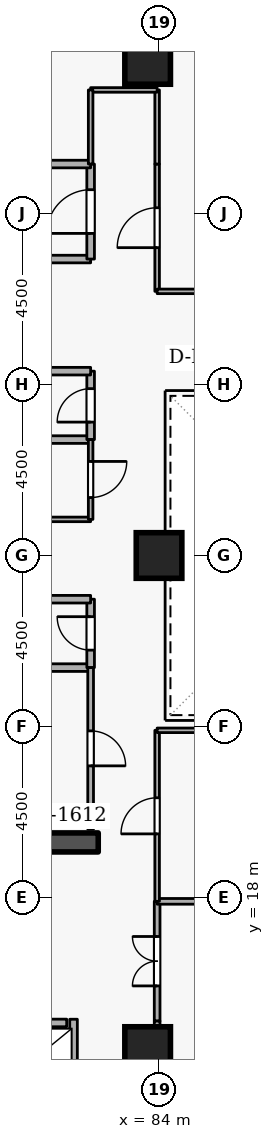
"""IFC4 building model, lengths in metres.
Left out: names, types, materials, properties, quantities, classifications, styles, units other than length and angle.
Written with IfcOpenShell. Run it as: python <this file> out.ifc"""

import sys

from ifc_helpers import new_model, si_unit, direction, frame, frame_2d, origin, origin_2d, place, context, subcontext, project, spatial, rectangle, extrude, element, fill, save


model = new_model("IFC4")
c1 = context("Model", 3, precision=1e-05, world=origin(), true_north=direction((0.0, 1.0)))
c2 = subcontext(c1, "Body", "Model", "MODEL_VIEW")
j1 = project(units=[si_unit("LENGTHUNIT", "METRE"), si_unit("PLANEANGLEUNIT", "RADIAN")], contexts=[c1])
p1 = place(None, origin())
s1 = spatial("IfcSite", under=j1, at=p1, CompositionType="ELEMENT")
p2 = place(p1, origin())
s2 = spatial("IfcBuilding", under=s1, at=p2, CompositionType="ELEMENT")
p3 = place(p2, frame((0.0, 0.0, 134.1)))
s3 = spatial("IfcBuildingStorey", under=s2, at=p3, CompositionType="ELEMENT", Elevation=134.1)
p4 = place(p3, frame((76.6, 19.45, 0.0), z_axis=(0.0, 0.0, 1.0), x_axis=(1.0, 0.0, 0.0)))
e1 = element("IfcWall", 1, at=p4, inside=s3, PredefinedType="SHEAR", context=c2, shape_type="SweptSolid", body=[
    extrude(rectangle(XDim=5.8, YDim=0.5, at=frame_2d((2.9, 0.0))), origin(), (0.0, 0.0, 1.0), 3.6),
])
for number, where, z_axis, x_axis in (
    (2, (83.7, 14.0, 0.0), (0.0, 0.0, 1.0), (1.0, 0.0, 0.0)),
    (3, (83.7, 40.0, 0.0), (0.0, 0.0, 1.0), (1.0, 0.0, 0.0)),
    (4, (84.0, 27.0, 0.0), (0.0, 0.0, 1.0), (1.0, 0.0, 0.0)),
):
    element("IfcColumn", number, at=place(p3, frame(where, z_axis=z_axis, x_axis=x_axis)), inside=s3, PredefinedType="COLUMN", context=c2, shape_type="SweptSolid", body=[
        extrude(rectangle(XDim=1.2, YDim=1.2, at=origin_2d()), origin(), (0.0, 0.0, 1.0), 3.6),
    ])
p5 = place(p3, frame((79.63, 14.7, 0.0), z_axis=(0.0, 0.0, 1.0), x_axis=(1.0, 0.0, 0.0)))
e5 = element("IfcWall", 5, at=p5, inside=s3, PredefinedType="STANDARD", context=c2, shape_type="SweptSolid", body=[
    extrude(rectangle(XDim=1.94, YDim=0.2, at=frame_2d((0.97, 0.0))), origin(), (0.0, 0.0, 1.0), 3.34),
])
p6 = place(p5, frame((0.46, 0.0, 0.0)))
e6 = element("IfcOpeningElement", 6, at=p6, cuts=e5, PredefinedType="OPENING", context=c2, shape_type="SweptSolid", body=[
    extrude(rectangle(XDim=1.02, YDim=2.06, at=frame_2d((0.51, 1.03))), frame((0.0, 0.11, 0.0), z_axis=(0.0, -1.0, 0.0), x_axis=(1.0, 0.0, 0.0)), (0.0, 0.0, 1.0), 0.22),
])
p7 = place(p3, frame((81.75, 12.612, 0.0), z_axis=(0.0, 0.0, 1.0), x_axis=(0.0, 1.0, 0.0)))
e7 = element("IfcWall", 7, at=p7, inside=s3, PredefinedType="STANDARD", context=c2, shape_type="SweptSolid", body=[
    extrude(rectangle(XDim=2.186, YDim=0.2, at=frame_2d((1.093, 0.0))), origin(), (0.0, 0.0, 1.0), 3.34),
])
p8 = place(p3, frame((79.9, 34.8, 0.0), z_axis=(0.0, 0.0, 1.0), x_axis=(1.0, 0.0, 0.0)))
e8 = element("IfcWall", 8, at=p8, inside=s3, PredefinedType="STANDARD", context=c2, shape_type="SweptSolid", body=[
    extrude(rectangle(XDim=2.3, YDim=0.2, at=frame_2d((1.15, 0.0))), origin(), (0.0, 0.0, 1.0), 2.545),
])
p9 = place(p3, frame((82.2, 34.8, 0.0), z_axis=(0.0, 0.0, 1.0), x_axis=(0.0, 1.0, 0.0)))
e9 = element("IfcWall", 9, at=p9, inside=s3, PredefinedType="STANDARD", context=c2, shape_type="SweptSolid", body=[
    extrude(rectangle(XDim=2.5, YDim=0.2, at=frame_2d((1.25, 0.0))), origin(), (0.0, 0.0, 1.0), 3.34),
])
p10 = place(p9, frame((0.675, 0.0, 0.0)))
e10 = element("IfcOpeningElement", 10, at=p10, cuts=e9, PredefinedType="OPENING", context=c2, shape_type="SweptSolid", body=[
    extrude(rectangle(XDim=1.15, YDim=2.1, at=frame_2d((0.575, 1.05))), frame((0.0, 0.11, 0.0), z_axis=(0.0, -1.0, 0.0), x_axis=(1.0, 0.0, 0.0)), (0.0, 0.0, 1.0), 0.22),
])
p11 = place(p3, frame((82.2, 37.3, 0.0), z_axis=(0.0, 0.0, 1.0), x_axis=(-1.0, 0.0, 0.0)))
e11 = element("IfcWall", 11, at=p11, inside=s3, PredefinedType="STANDARD", context=c2, shape_type="SweptSolid", body=[
    extrude(rectangle(XDim=5.7, YDim=0.2, at=frame_2d((2.85, 0.0))), origin(), (0.0, 0.0, 1.0), 3.34),
])
p12 = place(p3, frame((80.15, 24.05, 0.0), z_axis=(0.0, 0.0, 1.0), x_axis=(1.0, 0.0, 0.0)))
e12 = element("IfcWall", 12, at=p12, inside=s3, PredefinedType="STANDARD", context=c2, shape_type="SweptSolid", body=[
    extrude(rectangle(XDim=2.05, YDim=0.2, at=frame_2d((1.025, 0.0))), origin(), (0.0, 0.0, 1.0), 3.34),
])
p13 = place(p3, frame((82.2, 24.05, 0.0), z_axis=(0.0, 0.0, 1.0), x_axis=(0.0, 1.0, 0.0)))
e13 = element("IfcWall", 13, at=p13, inside=s3, PredefinedType="STANDARD", context=c2, shape_type="SweptSolid", body=[
    extrude(rectangle(XDim=1.8, YDim=0.2, at=frame_2d((0.9, 0.0))), origin(), (0.0, 0.0, 1.0), 3.34),
])
p14 = place(p13, frame((0.46, 0.0, 0.0)))
e14 = element("IfcOpeningElement", 14, at=p14, cuts=e13, PredefinedType="OPENING", context=c2, shape_type="SweptSolid", body=[
    extrude(rectangle(XDim=0.88, YDim=2.04, at=frame_2d((0.44, 1.02))), frame((0.0, 0.11, 0.0), z_axis=(0.0, -1.0, 0.0), x_axis=(1.0, 0.0, 0.0)), (0.0, 0.0, 1.0), 0.22),
])
for number, where, z_axis, x_axis in (
    (15, (82.2, 25.85, 0.0), (0.0, 0.0, 1.0), (-1.0, 0.0, 0.0)),
    (16, (80.15, 30.05, 0.0), (0.0, 0.0, 1.0), (1.0, 0.0, 0.0)),
):
    element("IfcWall", number, at=place(p3, frame(where, z_axis=z_axis, x_axis=x_axis)), inside=s3, PredefinedType="STANDARD", context=c2, shape_type="SweptSolid", body=[
        extrude(rectangle(XDim=2.05, YDim=0.2, at=frame_2d((1.025, 0.0))), origin(), (0.0, 0.0, 1.0), 3.34),
    ])
p15 = place(p3, frame((82.2, 30.05, 0.0), z_axis=(0.0, 0.0, 1.0), x_axis=(0.0, 1.0, 0.0)))
e17 = element("IfcWall", 17, at=p15, inside=s3, PredefinedType="STANDARD", context=c2, shape_type="SweptSolid", body=[
    extrude(rectangle(XDim=1.8, YDim=0.2, at=frame_2d((0.9, 0.0))), origin(), (0.0, 0.0, 1.0), 3.34),
])
p16 = place(p15, frame((0.46, 0.0, 0.0)))
e18 = element("IfcOpeningElement", 18, at=p16, cuts=e17, PredefinedType="OPENING", context=c2, shape_type="SweptSolid", body=[
    extrude(rectangle(XDim=0.88, YDim=2.04, at=frame_2d((0.44, 1.02))), frame((0.0, 0.11, 0.0), z_axis=(0.0, -1.0, 0.0), x_axis=(1.0, 0.0, 0.0)), (0.0, 0.0, 1.0), 0.22),
])
p17 = place(p3, frame((82.2, 31.85, 0.0), z_axis=(0.0, 0.0, 1.0), x_axis=(-1.0, 0.0, 0.0)))
e19 = element("IfcWall", 19, at=p17, inside=s3, PredefinedType="STANDARD", context=c2, shape_type="SweptSolid", body=[
    extrude(rectangle(XDim=2.05, YDim=0.2, at=frame_2d((1.025, 0.0))), origin(), (0.0, 0.0, 1.0), 3.34),
])
p18 = place(p3, frame((82.2, 24.05, 0.0), z_axis=(0.0, 0.0, 1.0), x_axis=(0.0, -1.0, 0.0)))
e20 = element("IfcWall", 20, at=p18, inside=s3, PredefinedType="PARTITIONING", context=c2, shape_type="SweptSolid", body=[
    extrude(rectangle(XDim=4.25, YDim=0.15, at=frame_2d((2.125, 0.0))), origin(), (0.0, 0.0, 1.0), 3.34),
])
p19 = place(p18, frame((1.665, 0.0, 0.0)))
e21 = element("IfcOpeningElement", 21, at=p19, cuts=e20, PredefinedType="OPENING", context=c2, shape_type="SweptSolid", body=[
    extrude(rectangle(XDim=0.92, YDim=2.08, at=frame_2d((0.46, 1.04))), frame((0.0, 0.085, 0.0), z_axis=(0.0, -1.0, 0.0), x_axis=(1.0, 0.0, 0.0)), (0.0, 0.0, 1.0), 0.17),
])
p20 = place(p3, frame((82.2, 27.95, 0.0), z_axis=(0.0, 0.0, 1.0), x_axis=(-1.0, 0.0, 0.0)))
e22 = element("IfcWall", 22, at=p20, inside=s3, PredefinedType="PARTITIONING", context=c2, shape_type="SweptSolid", body=[
    extrude(rectangle(XDim=2.05, YDim=0.12, at=frame_2d((1.025, 0.0))), origin(), (0.0, 0.0, 1.0), 3.34),
])
p21 = place(p3, frame((82.2, 30.05, 0.0), z_axis=(0.0, 0.0, 1.0), x_axis=(0.0, -1.0, 0.0)))
e23 = element("IfcWall", 23, at=p21, inside=s3, PredefinedType="PARTITIONING", context=c2, shape_type="SweptSolid", body=[
    extrude(rectangle(XDim=2.1, YDim=0.12, at=frame_2d((1.05, 0.0))), origin(), (0.0, 0.0, 1.0), 3.34),
])
p22 = place(p21, frame((0.575, 0.0, 0.0)))
e24 = element("IfcOpeningElement", 24, at=p22, cuts=e23, PredefinedType="OPENING", context=c2, shape_type="SweptSolid", body=[
    extrude(rectangle(XDim=0.95, YDim=2.1, at=frame_2d((0.475, 1.05))), frame((0.0, 0.07, 0.0), z_axis=(0.0, -1.0, 0.0), x_axis=(1.0, 0.0, 0.0)), (0.0, 0.0, 1.0), 0.14),
])
p23 = place(p3, frame((83.95, 14.75, 0.0), z_axis=(0.0, 0.0, 1.0), x_axis=(0.0, 1.0, 0.0)))
e25 = element("IfcWall", 25, at=p23, inside=s3, PredefinedType="PARTITIONING", context=c2, shape_type="SweptSolid", body=[
    extrude(rectangle(XDim=3.15, YDim=0.15, at=frame_2d((1.575, 0.0))), origin(), (0.0, 0.0, 1.0), 3.34),
])
p24 = place(p23, frame((0.925, 0.0, 0.0)))
e26 = element("IfcOpeningElement", 26, at=p24, cuts=e25, PredefinedType="OPENING", context=c2, shape_type="SweptSolid", body=[
    extrude(rectangle(XDim=1.3, YDim=2.12, at=frame_2d((0.65, 1.06))), frame((0.0, 0.085, 0.0), z_axis=(0.0, -1.0, 0.0), x_axis=(1.0, 0.0, 0.0)), (0.0, 0.0, 1.0), 0.17),
])
p25 = place(p3, frame((83.95, 17.9, 0.0), z_axis=(0.0, 0.0, 1.0), x_axis=(1.0, 0.0, 0.0)))
e27 = element("IfcWall", 27, at=p25, inside=s3, PredefinedType="PARTITIONING", context=c2, shape_type="SweptSolid", body=[
    extrude(rectangle(XDim=4.55, YDim=0.15, at=frame_2d((2.275, 0.0))), origin(), (0.0, 0.0, 1.0), 3.34),
])
p26 = place(p3, frame((83.95, 12.4, 0.0), z_axis=(0.0, 0.0, 1.0), x_axis=(0.0, 1.0, 0.0)))
e28 = element("IfcWall", 28, at=p26, inside=s3, PredefinedType="PARTITIONING", context=c2, shape_type="SweptSolid", body=[
    extrude(rectangle(XDim=2.35, YDim=0.15, at=frame_2d((1.175, 0.0))), origin(), (0.0, 0.0, 1.0), 3.34),
])
p27 = place(p3, frame((83.95, 17.9, 0.0), z_axis=(0.0, 0.0, 1.0), x_axis=(0.0, 1.0, 0.0)))
e29 = element("IfcWall", 29, at=p27, inside=s3, PredefinedType="PARTITIONING", context=c2, shape_type="SweptSolid", body=[
    extrude(rectangle(XDim=4.5, YDim=0.12, at=frame_2d((2.25, 0.0))), origin(), (0.0, 0.0, 1.0), 3.34),
])
p28 = place(p27, frame((1.775, 0.0, 0.0)))
e30 = element("IfcOpeningElement", 30, at=p28, cuts=e29, PredefinedType="OPENING", context=c2, shape_type="SweptSolid", body=[
    extrude(rectangle(XDim=0.95, YDim=2.1, at=frame_2d((0.475, 1.05))), frame((0.0, 0.07, 0.0), z_axis=(0.0, -1.0, 0.0), x_axis=(1.0, 0.0, 0.0)), (0.0, 0.0, 1.0), 0.14),
])
p29 = place(p3, frame((83.95, 22.4, 0.0), z_axis=(0.0, 0.0, 1.0), x_axis=(1.0, 0.0, 0.0)))
e31 = element("IfcWall", 31, at=p29, inside=s3, PredefinedType="PARTITIONING", context=c2, shape_type="SweptSolid", body=[
    extrude(rectangle(XDim=9.1, YDim=0.12, at=frame_2d((4.55, 0.0))), origin(), (0.0, 0.0, 1.0), 3.34),
])
p30 = place(p3, frame((83.95, 33.95, 0.0), z_axis=(0.0, 0.0, 1.0), x_axis=(0.0, 1.0, 0.0)))
e32 = element("IfcWall", 32, at=p30, inside=s3, PredefinedType="PARTITIONING", context=c2, shape_type="SweptSolid", body=[
    extrude(rectangle(XDim=3.35, YDim=0.12, at=frame_2d((1.675, 0.0))), origin(), (0.0, 0.0, 1.0), 3.34),
])
p31 = place(p30, frame((1.15, 0.0, 0.0)))
e33 = element("IfcOpeningElement", 33, at=p31, cuts=e32, PredefinedType="OPENING", context=c2, shape_type="SweptSolid", body=[
    extrude(rectangle(XDim=1.05, YDim=2.1, at=frame_2d((0.525, 1.05))), frame((0.0, 0.07, 0.0), z_axis=(0.0, -1.0, 0.0), x_axis=(1.0, 0.0, 0.0)), (0.0, 0.0, 1.0), 0.14),
])
p32 = place(p3, frame((83.95, 37.3, 0.0), z_axis=(0.0, 0.0, 1.0), x_axis=(0.0, 1.0, 0.0)))
e34 = element("IfcWall", 34, at=p32, inside=s3, PredefinedType="PARTITIONING", context=c2, shape_type="SweptSolid", body=[
    extrude(rectangle(XDim=1.95, YDim=0.12, at=frame_2d((0.975, 0.0))), origin(), (0.0, 0.0, 1.0), 3.34),
])
p33 = place(p3, frame((83.95, 39.25, 0.0), z_axis=(0.0, 0.0, 1.0), x_axis=(-1.0, 0.0, 0.0)))
e35 = element("IfcWall", 35, at=p33, inside=s3, PredefinedType="PARTITIONING", context=c2, shape_type="SweptSolid", body=[
    extrude(rectangle(XDim=1.75, YDim=0.12, at=frame_2d((0.875, 0.0))), origin(), (0.0, 0.0, 1.0), 3.34),
])
p34 = place(p3, frame((82.2, 39.25, 0.0), z_axis=(0.0, 0.0, 1.0), x_axis=(0.0, -1.0, 0.0)))
e36 = element("IfcWall", 36, at=p34, inside=s3, PredefinedType="PARTITIONING", context=c2, shape_type="SweptSolid", body=[
    extrude(rectangle(XDim=1.95, YDim=0.12, at=frame_2d((0.975, 0.0))), origin(), (0.0, 0.0, 1.0), 3.34),
])
p35 = place(p3, frame((86.25, 33.95, 0.0), z_axis=(0.0, 0.0, 1.0), x_axis=(-1.0, 0.0, 0.0)))
e37 = element("IfcWall", 37, at=p35, inside=s3, PredefinedType="PARTITIONING", context=c2, shape_type="SweptSolid", body=[
    extrude(rectangle(XDim=2.3, YDim=0.12, at=frame_2d((1.15, 0.0))), origin(), (0.0, 0.0, 1.0), 3.34),
])
p36 = place(p10, origin())
e38 = element("IfcDoor", 38, at=p36, inside=s3, OperationType="SINGLE_SWING_LEFT", PredefinedType="DOOR", context=c2, shape_type="SweptSolid", body=[
    extrude(rectangle(XDim=1.15, YDim=2.1, at=frame_2d((0.575, 1.05))), frame((0.0, 0.025, 0.0), z_axis=(0.0, -1.0, 0.0), x_axis=(1.0, 0.0, 0.0)), (0.0, 0.0, 1.0), 0.05),
])
fill(e10, e38)
p37 = place(p14, origin())
e39 = element("IfcDoor", 39, at=p37, inside=s3, OperationType="SINGLE_SWING_RIGHT", PredefinedType="DOOR", context=c2, shape_type="SweptSolid", body=[
    extrude(rectangle(XDim=0.88, YDim=2.04, at=frame_2d((0.44, 1.02))), frame((0.0, 0.025, 0.0), z_axis=(0.0, -1.0, 0.0), x_axis=(1.0, 0.0, 0.0)), (0.0, 0.0, 1.0), 0.05),
])
fill(e14, e39)
p38 = place(p16, origin())
e40 = element("IfcDoor", 40, at=p38, inside=s3, OperationType="SINGLE_SWING_LEFT", PredefinedType="DOOR", context=c2, shape_type="SweptSolid", body=[
    extrude(rectangle(XDim=0.88, YDim=2.04, at=frame_2d((0.44, 1.02))), frame((0.0, 0.025, 0.0), z_axis=(0.0, -1.0, 0.0), x_axis=(1.0, 0.0, 0.0)), (0.0, 0.0, 1.0), 0.05),
])
fill(e18, e40)
p39 = place(p19, origin())
e41 = element("IfcDoor", 41, at=p39, inside=s3, OperationType="SINGLE_SWING_RIGHT", PredefinedType="DOOR", context=c2, shape_type="SweptSolid", body=[
    extrude(rectangle(XDim=0.92, YDim=2.08, at=frame_2d((0.46, 1.04))), frame((0.0, 0.025, 0.0), z_axis=(0.0, -1.0, 0.0), x_axis=(1.0, 0.0, 0.0)), (0.0, 0.0, 1.0), 0.05),
])
fill(e21, e41)
p40 = place(p22, origin())
e42 = element("IfcDoor", 42, at=p40, inside=s3, OperationType="SINGLE_SWING_LEFT", PredefinedType="DOOR", context=c2, shape_type="SweptSolid", body=[
    extrude(rectangle(XDim=0.95, YDim=2.1, at=frame_2d((0.475, 1.05))), frame((0.0, 0.025, 0.0), z_axis=(0.0, -1.0, 0.0), x_axis=(1.0, 0.0, 0.0)), (0.0, 0.0, 1.0), 0.05),
])
fill(e24, e42)
p41 = place(p24, origin())
e43 = element("IfcDoor", 43, at=p41, inside=s3, OperationType="DOUBLE_DOOR_SINGLE_SWING", PredefinedType="DOOR", context=c2, shape_type="SweptSolid", body=[
    extrude(rectangle(XDim=1.3, YDim=2.12, at=frame_2d((0.65, 1.06))), frame((0.0, 0.025, 0.0), z_axis=(0.0, -1.0, 0.0), x_axis=(1.0, 0.0, 0.0)), (0.0, 0.0, 1.0), 0.05),
])
fill(e26, e43)
p42 = place(p28, origin())
e44 = element("IfcDoor", 44, at=p42, inside=s3, OperationType="SINGLE_SWING_LEFT", PredefinedType="DOOR", context=c2, shape_type="SweptSolid", body=[
    extrude(rectangle(XDim=0.95, YDim=2.1, at=frame_2d((0.475, 1.05))), frame((0.0, 0.025, 0.0), z_axis=(0.0, -1.0, 0.0), x_axis=(1.0, 0.0, 0.0)), (0.0, 0.0, 1.0), 0.05),
])
fill(e30, e44)
p43 = place(p31, origin())
e45 = element("IfcDoor", 45, at=p43, inside=s3, OperationType="SINGLE_SWING_LEFT", PredefinedType="DOOR", context=c2, shape_type="SweptSolid", body=[
    extrude(rectangle(XDim=1.05, YDim=2.1, at=frame_2d((0.525, 1.05))), frame((0.0, 0.025, 0.0), z_axis=(0.0, -1.0, 0.0), x_axis=(1.0, 0.0, 0.0)), (0.0, 0.0, 1.0), 0.05),
])
fill(e33, e45)
save(model, sys.argv[1])
